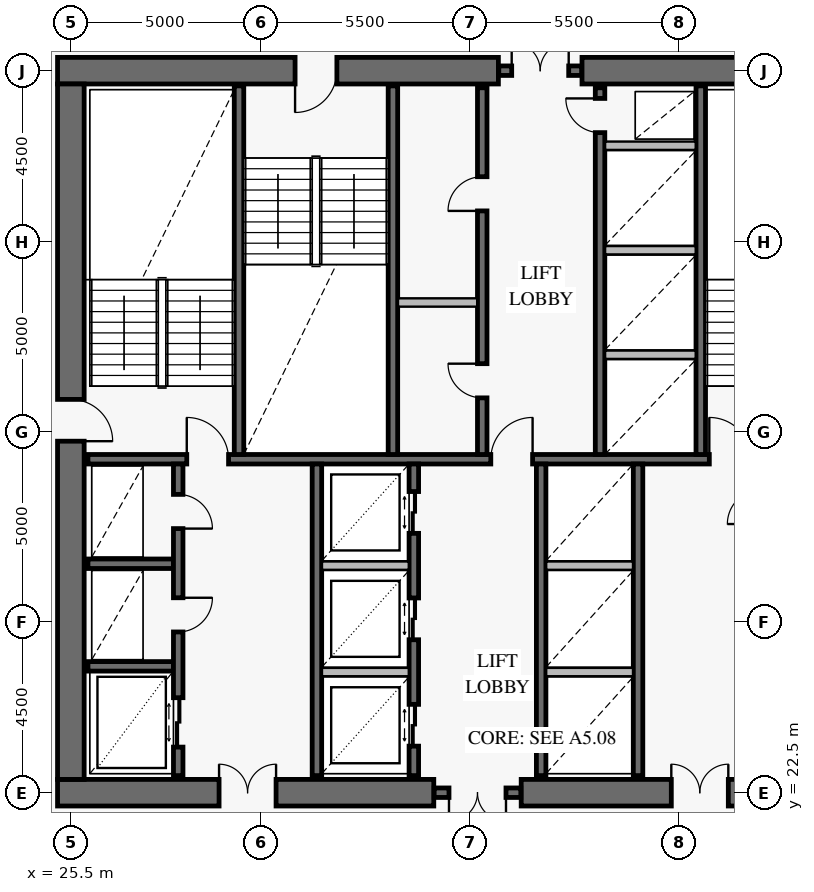
"""IFC4 building model, lengths in metres.
Left out: names, types, materials, properties, quantities, classifications, styles, units other than length and angle.
Written with IfcOpenShell. Run it as: python <this file> out.ifc"""

import sys

from ifc_helpers import new_model, si_unit, direction, frame, frame_2d, origin, place, context, subcontext, project, spatial, rectangle, extrude, element, fill, save


model = new_model("IFC4")
c1 = context("Model", 3, precision=1e-05, world=origin(), true_north=direction((0.0, 1.0)))
c2 = subcontext(c1, "Body", "Model", "MODEL_VIEW")
j1 = project(units=[si_unit("LENGTHUNIT", "METRE"), si_unit("PLANEANGLEUNIT", "RADIAN")], contexts=[c1])
p1 = place(None, origin())
s1 = spatial("IfcSite", under=j1, at=p1, CompositionType="ELEMENT")
p2 = place(p1, origin())
s2 = spatial("IfcBuilding", under=s1, at=p2, CompositionType="ELEMENT")
p3 = place(p2, frame((0.0, 0.0, 92.4)))
s3 = spatial("IfcBuildingStorey", under=s2, at=p3, CompositionType="ELEMENT", Elevation=92.4)
p4 = place(p3, frame((25.15, 22.5, 0.0), z_axis=(0.0, 0.0, 1.0), x_axis=(1.0, 0.0, 0.0)))
e1 = element("IfcWall", 1, at=p4, inside=s3, PredefinedType="SHEAR", context=c2, shape_type="SweptSolid", body=[
    extrude(rectangle(XDim=9.9, YDim=0.7, at=frame_2d((4.95, 0.0))), origin(), (0.0, 0.0, 1.0), 3.8),
])
p5 = place(p4, frame((4.25, 0.0, 0.0)))
e2 = element("IfcOpeningElement", 2, at=p5, cuts=e1, PredefinedType="OPENING", context=c2, shape_type="SweptSolid", body=[
    extrude(rectangle(XDim=1.5, YDim=2.15, at=frame_2d((0.75, 1.075))), frame((0.0, 0.362, 0.0), z_axis=(0.0, -1.0, 0.0), x_axis=(1.0, 0.0, 0.0)), (0.0, 0.0, 1.0), 0.724),
])
p6 = place(p3, frame((37.35, 22.5, 0.0), z_axis=(0.0, 0.0, 1.0), x_axis=(1.0, 0.0, 0.0)))
e3 = element("IfcWall", 3, at=p6, inside=s3, PredefinedType="SHEAR", context=c2, shape_type="SweptSolid", body=[
    extrude(rectangle(XDim=9.5, YDim=0.7, at=frame_2d((4.75, 0.0))), origin(), (0.0, 0.0, 1.0), 3.8),
])
p7 = place(p6, frame((3.95, 0.0, 0.0)))
e4 = element("IfcOpeningElement", 4, at=p7, cuts=e3, PredefinedType="OPENING", context=c2, shape_type="SweptSolid", body=[
    extrude(rectangle(XDim=1.5, YDim=2.15, at=frame_2d((0.75, 1.075))), frame((0.0, 0.362, 0.0), z_axis=(0.0, -1.0, 0.0), x_axis=(1.0, 0.0, 0.0)), (0.0, 0.0, 1.0), 0.724),
])
p8 = place(p3, frame((46.85, 41.5, 0.0), z_axis=(0.0, 0.0, 1.0), x_axis=(-1.0, 0.0, 0.0)))
e5 = element("IfcWall", 5, at=p8, inside=s3, PredefinedType="SHEAR", context=c2, shape_type="SweptSolid", body=[
    extrude(rectangle(XDim=7.9, YDim=0.7, at=frame_2d((3.95, 0.0))), origin(), (0.0, 0.0, 1.0), 3.8),
])
p9 = place(p3, frame((36.75, 41.5, 0.0), z_axis=(0.0, 0.0, 1.0), x_axis=(-1.0, 0.0, 0.0)))
e6 = element("IfcWall", 6, at=p9, inside=s3, PredefinedType="SHEAR", context=c2, shape_type="SweptSolid", body=[
    extrude(rectangle(XDim=11.6, YDim=0.7, at=frame_2d((5.8, 0.0))), origin(), (0.0, 0.0, 1.0), 3.8),
])
p10 = place(p9, frame((4.25, 0.0, 0.0)))
e7 = element("IfcOpeningElement", 7, at=p10, cuts=e6, PredefinedType="OPENING", context=c2, shape_type="SweptSolid", body=[
    extrude(rectangle(XDim=1.1, YDim=2.15, at=frame_2d((0.55, 1.075))), frame((0.0, 0.362, 0.0), z_axis=(0.0, -1.0, 0.0), x_axis=(1.0, 0.0, 0.0)), (0.0, 0.0, 1.0), 0.724),
])
p11 = place(p3, frame((25.5, 22.85, 0.0), z_axis=(0.0, 0.0, 1.0), x_axis=(0.0, 1.0, 0.0)))
e8 = element("IfcWall", 8, at=p11, inside=s3, PredefinedType="SHEAR", context=c2, shape_type="SweptSolid", body=[
    extrude(rectangle(XDim=18.3, YDim=0.7, at=frame_2d((9.15, 0.0))), origin(), (0.0, 0.0, 1.0), 3.8),
])
p12 = place(p11, frame((8.9, 0.0, 0.0)))
e9 = element("IfcOpeningElement", 9, at=p12, cuts=e8, PredefinedType="OPENING", context=c2, shape_type="SweptSolid", body=[
    extrude(rectangle(XDim=1.1, YDim=2.15, at=frame_2d((0.55, 1.075))), frame((0.0, 0.362, 0.0), z_axis=(0.0, -1.0, 0.0), x_axis=(1.0, 0.0, 0.0)), (0.0, 0.0, 1.0), 0.724),
])
p13 = place(p3, frame((35.06, 22.5, 0.0), z_axis=(0.0, 0.0, 1.0), x_axis=(1.0, 0.0, 0.0)))
e10 = element("IfcWall", 10, at=p13, inside=s3, PredefinedType="SOLIDWALL", context=c2, shape_type="SweptSolid", body=[
    extrude(rectangle(XDim=2.28, YDim=0.25, at=frame_2d((1.14, 0.0))), origin(), (0.0, 0.0, 1.0), 3.8),
])
p14 = place(p13, frame((0.39, 0.0, 0.0)))
e11 = element("IfcOpeningElement", 11, at=p14, cuts=e10, PredefinedType="OPENING", context=c2, shape_type="SweptSolid", body=[
    extrude(rectangle(XDim=1.5, YDim=2.15, at=frame_2d((0.75, 1.075))), frame((0.0, 0.137, 0.0), z_axis=(0.0, -1.0, 0.0), x_axis=(1.0, 0.0, 0.0)), (0.0, 0.0, 1.0), 0.274),
])
p15 = place(p3, frame((36.76, 41.5, 0.0), z_axis=(0.0, 0.0, 1.0), x_axis=(1.0, 0.0, 0.0)))
e12 = element("IfcWall", 12, at=p15, inside=s3, PredefinedType="SOLIDWALL", context=c2, shape_type="SweptSolid", body=[
    extrude(rectangle(XDim=2.18, YDim=0.25, at=frame_2d((1.09, 0.0))), origin(), (0.0, 0.0, 1.0), 3.8),
])
p16 = place(p15, frame((0.34, 0.0, 0.0)))
e13 = element("IfcOpeningElement", 13, at=p16, cuts=e12, PredefinedType="OPENING", context=c2, shape_type="SweptSolid", body=[
    extrude(rectangle(XDim=1.5, YDim=2.15, at=frame_2d((0.75, 1.075))), frame((0.0, 0.137, 0.0), z_axis=(0.0, -1.0, 0.0), x_axis=(1.0, 0.0, 0.0)), (0.0, 0.0, 1.0), 0.274),
])
p17 = place(p3, frame((25.95, 31.275, 0.0), z_axis=(0.0, 0.0, 1.0), x_axis=(1.0, 0.0, 0.0)))
e14 = element("IfcWall", 14, at=p17, inside=s3, PredefinedType="SOLIDWALL", context=c2, shape_type="SweptSolid", body=[
    extrude(rectangle(XDim=20.1, YDim=0.25, at=frame_2d((10.05, 0.0))), origin(), (0.0, 0.0, 1.0), 3.8),
])
p18 = place(p17, frame((2.6, 0.0, 0.0)))
e15 = element("IfcOpeningElement", 15, at=p18, cuts=e14, PredefinedType="OPENING", context=c2, shape_type="SweptSolid", body=[
    extrude(rectangle(XDim=1.1, YDim=2.15, at=frame_2d((0.55, 1.075))), frame((0.0, 0.137, 0.0), z_axis=(0.0, -1.0, 0.0), x_axis=(1.0, 0.0, 0.0)), (0.0, 0.0, 1.0), 0.274),
])
p19 = place(p17, frame((10.6, 0.0, 0.0)))
e16 = element("IfcOpeningElement", 16, at=p19, cuts=e14, PredefinedType="OPENING", context=c2, shape_type="SweptSolid", body=[
    extrude(rectangle(XDim=1.1, YDim=2.15, at=frame_2d((0.55, 1.075))), frame((0.0, 0.137, 0.0), z_axis=(0.0, -1.0, 0.0), x_axis=(1.0, 0.0, 0.0)), (0.0, 0.0, 1.0), 0.274),
])
p20 = place(p17, frame((16.35, 0.0, 0.0)))
e17 = element("IfcOpeningElement", 17, at=p20, cuts=e14, PredefinedType="OPENING", context=c2, shape_type="SweptSolid", body=[
    extrude(rectangle(XDim=1.1, YDim=2.15, at=frame_2d((0.55, 1.075))), frame((0.0, 0.137, 0.0), z_axis=(0.0, -1.0, 0.0), x_axis=(1.0, 0.0, 0.0)), (0.0, 0.0, 1.0), 0.274),
])
for number, where, z_axis, x_axis in (
    (18, (29.925, 31.4, 0.0), (0.0, 0.0, 1.0), (0.0, 1.0, 0.0)),
    (19, (33.975, 31.4, 0.0), (0.0, 0.0, 1.0), (0.0, 1.0, 0.0)),
    (20, (42.075, 31.4, 0.0), (0.0, 0.0, 1.0), (0.0, 1.0, 0.0)),
):
    element("IfcWall", number, at=place(p3, frame(where, z_axis=z_axis, x_axis=x_axis)), inside=s3, PredefinedType="SOLIDWALL", context=c2, shape_type="SweptSolid", body=[
        extrude(rectangle(XDim=9.7, YDim=0.25, at=frame_2d((4.85, 0.0))), origin(), (0.0, 0.0, 1.0), 3.8),
    ])
p21 = place(p3, frame((36.325, 31.4, 0.0), z_axis=(0.0, 0.0, 1.0), x_axis=(0.0, 1.0, 0.0)))
e21 = element("IfcWall", 21, at=p21, inside=s3, PredefinedType="SOLIDWALL", context=c2, shape_type="SweptSolid", body=[
    extrude(rectangle(XDim=9.65, YDim=0.25, at=frame_2d((4.825, 0.0))), origin(), (0.0, 0.0, 1.0), 3.8),
])
p22 = place(p21, frame((1.49, 0.0, 0.0)))
e22 = element("IfcOpeningElement", 22, at=p22, cuts=e21, PredefinedType="OPENING", context=c2, shape_type="SweptSolid", body=[
    extrude(rectangle(XDim=0.9, YDim=2.1, at=frame_2d((0.45, 1.05))), frame((0.0, 0.137, 0.0), z_axis=(0.0, -1.0, 0.0), x_axis=(1.0, 0.0, 0.0)), (0.0, 0.0, 1.0), 0.274),
])
p23 = place(p21, frame((6.41, 0.0, 0.0)))
e23 = element("IfcOpeningElement", 23, at=p23, cuts=e21, PredefinedType="OPENING", context=c2, shape_type="SweptSolid", body=[
    extrude(rectangle(XDim=0.9, YDim=2.1, at=frame_2d((0.45, 1.05))), frame((0.0, 0.137, 0.0), z_axis=(0.0, -1.0, 0.0), x_axis=(1.0, 0.0, 0.0)), (0.0, 0.0, 1.0), 0.274),
])
p24 = place(p3, frame((39.425, 31.4, 0.0), z_axis=(0.0, 0.0, 1.0), x_axis=(0.0, 1.0, 0.0)))
e24 = element("IfcWall", 24, at=p24, inside=s3, PredefinedType="SOLIDWALL", context=c2, shape_type="SweptSolid", body=[
    extrude(rectangle(XDim=9.65, YDim=0.25, at=frame_2d((4.825, 0.0))), origin(), (0.0, 0.0, 1.0), 3.8),
])
p25 = place(p24, frame((8.47, 0.0, 0.0)))
e25 = element("IfcOpeningElement", 25, at=p25, cuts=e24, PredefinedType="OPENING", context=c2, shape_type="SweptSolid", body=[
    extrude(rectangle(XDim=0.9, YDim=2.1, at=frame_2d((0.45, 1.05))), frame((0.0, 0.137, 0.0), z_axis=(0.0, -1.0, 0.0), x_axis=(1.0, 0.0, 0.0)), (0.0, 0.0, 1.0), 0.274),
])
for number, where, z_axis, x_axis in (
    (26, (25.95, 25.825, 0.0), (0.0, 0.0, 1.0), (1.0, 0.0, 0.0)),
    (27, (25.95, 28.525, 0.0), (0.0, 0.0, 1.0), (1.0, 0.0, 0.0)),
):
    element("IfcWall", number, at=place(p3, frame(where, z_axis=z_axis, x_axis=x_axis)), inside=s3, PredefinedType="SOLIDWALL", context=c2, shape_type="SweptSolid", body=[
        extrude(rectangle(XDim=2.25, YDim=0.25, at=frame_2d((1.125, 0.0))), origin(), (0.0, 0.0, 1.0), 3.8),
    ])
p26 = place(p3, frame((28.325, 22.95, 0.0), z_axis=(0.0, 0.0, 1.0), x_axis=(0.0, 1.0, 0.0)))
e28 = element("IfcWall", 28, at=p26, inside=s3, PredefinedType="SOLIDWALL", context=c2, shape_type="SweptSolid", body=[
    extrude(rectangle(XDim=8.2, YDim=0.25, at=frame_2d((4.1, 0.0))), origin(), (0.0, 0.0, 1.0), 3.8),
])
p27 = place(p26, frame((0.75, 0.0, 0.0)))
e29 = element("IfcOpeningElement", 29, at=p27, cuts=e28, PredefinedType="OPENING", context=c2, shape_type="SweptSolid", body=[
    extrude(rectangle(XDim=1.3, YDim=2.3, at=frame_2d((0.65, 1.15))), frame((0.0, 0.137, 0.0), z_axis=(0.0, -1.0, 0.0), x_axis=(1.0, 0.0, 0.0)), (0.0, 0.0, 1.0), 0.274),
])
p28 = place(p26, frame((3.78, 0.0, 0.0)))
e30 = element("IfcOpeningElement", 30, at=p28, cuts=e28, PredefinedType="OPENING", context=c2, shape_type="SweptSolid", body=[
    extrude(rectangle(XDim=0.9, YDim=2.1, at=frame_2d((0.45, 1.05))), frame((0.0, 0.137, 0.0), z_axis=(0.0, -1.0, 0.0), x_axis=(1.0, 0.0, 0.0)), (0.0, 0.0, 1.0), 0.274),
])
p29 = place(p26, frame((6.5, 0.0, 0.0)))
e31 = element("IfcOpeningElement", 31, at=p29, cuts=e28, PredefinedType="OPENING", context=c2, shape_type="SweptSolid", body=[
    extrude(rectangle(XDim=0.9, YDim=2.1, at=frame_2d((0.45, 1.05))), frame((0.0, 0.137, 0.0), z_axis=(0.0, -1.0, 0.0), x_axis=(1.0, 0.0, 0.0)), (0.0, 0.0, 1.0), 0.274),
])
p30 = place(p3, frame((31.975, 22.95, 0.0), z_axis=(0.0, 0.0, 1.0), x_axis=(0.0, 1.0, 0.0)))
e32 = element("IfcWall", 32, at=p30, inside=s3, PredefinedType="SOLIDWALL", context=c2, shape_type="SweptSolid", body=[
    extrude(rectangle(XDim=8.2, YDim=0.25, at=frame_2d((4.1, 0.0))), origin(), (0.0, 0.0, 1.0), 3.8),
])
p31 = place(p3, frame((34.525, 22.95, 0.0), z_axis=(0.0, 0.0, 1.0), x_axis=(0.0, 1.0, 0.0)))
e33 = element("IfcWall", 33, at=p31, inside=s3, PredefinedType="SOLIDWALL", context=c2, shape_type="SweptSolid", body=[
    extrude(rectangle(XDim=8.2, YDim=0.25, at=frame_2d((4.1, 0.0))), origin(), (0.0, 0.0, 1.0), 3.8),
])
p32 = place(p31, frame((0.775, 0.0, 0.0)))
e34 = element("IfcOpeningElement", 34, at=p32, cuts=e33, PredefinedType="OPENING", context=c2, shape_type="SweptSolid", body=[
    extrude(rectangle(XDim=1.1, YDim=2.2, at=frame_2d((0.55, 1.1))), frame((0.0, 0.137, 0.0), z_axis=(0.0, -1.0, 0.0), x_axis=(1.0, 0.0, 0.0)), (0.0, 0.0, 1.0), 0.274),
])
p33 = place(p31, frame((3.575, 0.0, 0.0)))
e35 = element("IfcOpeningElement", 35, at=p33, cuts=e33, PredefinedType="OPENING", context=c2, shape_type="SweptSolid", body=[
    extrude(rectangle(XDim=1.1, YDim=2.2, at=frame_2d((0.55, 1.1))), frame((0.0, 0.137, 0.0), z_axis=(0.0, -1.0, 0.0), x_axis=(1.0, 0.0, 0.0)), (0.0, 0.0, 1.0), 0.274),
])
p34 = place(p31, frame((6.375, 0.0, 0.0)))
e36 = element("IfcOpeningElement", 36, at=p34, cuts=e33, PredefinedType="OPENING", context=c2, shape_type="SweptSolid", body=[
    extrude(rectangle(XDim=1.1, YDim=2.2, at=frame_2d((0.55, 1.1))), frame((0.0, 0.137, 0.0), z_axis=(0.0, -1.0, 0.0), x_axis=(1.0, 0.0, 0.0)), (0.0, 0.0, 1.0), 0.274),
])
for number, where, z_axis, x_axis in (
    (37, (37.875, 22.95, 0.0), (0.0, 0.0, 1.0), (0.0, 1.0, 0.0)),
    (38, (40.425, 22.95, 0.0), (0.0, 0.0, 1.0), (0.0, 1.0, 0.0)),
):
    element("IfcWall", number, at=place(p3, frame(where, z_axis=z_axis, x_axis=x_axis)), inside=s3, PredefinedType="SOLIDWALL", context=c2, shape_type="SweptSolid", body=[
        extrude(rectangle(XDim=8.2, YDim=0.25, at=frame_2d((4.1, 0.0))), origin(), (0.0, 0.0, 1.0), 3.8),
    ])
p35 = place(p3, frame((34.108, 35.4, 0.0), z_axis=(0.0, 0.0, 1.0), x_axis=(1.0, 0.0, 0.0)))
e39 = element("IfcWall", 39, at=p35, inside=s3, PredefinedType="PARTITIONING", context=c2, shape_type="SweptSolid", body=[
    extrude(rectangle(XDim=2.084, YDim=0.22, at=frame_2d((1.042, 0.0))), origin(), (0.0, 0.0, 1.0), 3.55),
])
for number, where, z_axis, x_axis in (
    (40, (39.558, 34.025, 0.0), (0.0, 0.0, 1.0), (1.0, 0.0, 0.0)),
    (41, (39.558, 36.775, 0.0), (0.0, 0.0, 1.0), (1.0, 0.0, 0.0)),
    (42, (39.558, 39.525, 0.0), (0.0, 0.0, 1.0), (1.0, 0.0, 0.0)),
):
    element("IfcWall", number, at=place(p3, frame(where, z_axis=z_axis, x_axis=x_axis)), inside=s3, PredefinedType="PARTITIONING", context=c2, shape_type="SweptSolid", body=[
        extrude(rectangle(XDim=2.384, YDim=0.22, at=frame_2d((1.192, 0.0))), origin(), (0.0, 0.0, 1.0), 3.55),
    ])
for number, where, z_axis, x_axis in (
    (43, (32.108, 25.675, 0.0), (0.0, 0.0, 1.0), (1.0, 0.0, 0.0)),
    (44, (32.108, 28.475, 0.0), (0.0, 0.0, 1.0), (1.0, 0.0, 0.0)),
):
    element("IfcWall", number, at=place(p3, frame(where, z_axis=z_axis, x_axis=x_axis)), inside=s3, PredefinedType="PARTITIONING", context=c2, shape_type="SweptSolid", body=[
        extrude(rectangle(XDim=2.284, YDim=0.22, at=frame_2d((1.142, 0.0))), origin(), (0.0, 0.0, 1.0), 3.55),
    ])
for number, where, z_axis, x_axis in (
    (45, (38.008, 25.675, 0.0), (0.0, 0.0, 1.0), (1.0, 0.0, 0.0)),
    (46, (38.008, 28.475, 0.0), (0.0, 0.0, 1.0), (1.0, 0.0, 0.0)),
):
    element("IfcWall", number, at=place(p3, frame(where, z_axis=z_axis, x_axis=x_axis)), inside=s3, PredefinedType="PARTITIONING", context=c2, shape_type="SweptSolid", body=[
        extrude(rectangle(XDim=2.284, YDim=0.22, at=frame_2d((1.142, 0.0))), origin(), (0.0, 0.0, 1.0), 3.55),
    ])
p36 = place(p12, frame((1.1, 0.0, 0.0), z_axis=(0.0, 0.0, 1.0), x_axis=(-1.0, 0.0, 0.0)))
e47 = element("IfcDoor", 47, at=p36, inside=s3, OperationType="SINGLE_SWING_RIGHT", PredefinedType="USERDEFINED", context=c2, shape_type="SweptSolid", body=[
    extrude(rectangle(XDim=1.1, YDim=2.15, at=frame_2d((0.55, 1.075))), frame((0.0, 0.025, 0.0), z_axis=(0.0, -1.0, 0.0), x_axis=(1.0, 0.0, 0.0)), (0.0, 0.0, 1.0), 0.05),
])
fill(e9, e47)
p37 = place(p10, origin())
e48 = element("IfcDoor", 48, at=p37, inside=s3, OperationType="SINGLE_SWING_RIGHT", PredefinedType="USERDEFINED", context=c2, shape_type="SweptSolid", body=[
    extrude(rectangle(XDim=1.1, YDim=2.15, at=frame_2d((0.55, 1.075))), frame((0.0, 0.025, 0.0), z_axis=(0.0, -1.0, 0.0), x_axis=(1.0, 0.0, 0.0)), (0.0, 0.0, 1.0), 0.05),
])
fill(e7, e48)
p38 = place(p5, origin())
e49 = element("IfcDoor", 49, at=p38, inside=s3, OperationType="DOUBLE_DOOR_SINGLE_SWING", PredefinedType="DOOR", context=c2, shape_type="SweptSolid", body=[
    extrude(rectangle(XDim=1.5, YDim=2.15, at=frame_2d((0.75, 1.075))), frame((0.0, 0.025, 0.0), z_axis=(0.0, -1.0, 0.0), x_axis=(1.0, 0.0, 0.0)), (0.0, 0.0, 1.0), 0.05),
])
fill(e2, e49)
p39 = place(p7, origin())
e50 = element("IfcDoor", 50, at=p39, inside=s3, OperationType="DOUBLE_DOOR_SINGLE_SWING", PredefinedType="DOOR", context=c2, shape_type="SweptSolid", body=[
    extrude(rectangle(XDim=1.5, YDim=2.15, at=frame_2d((0.75, 1.075))), frame((0.0, 0.025, 0.0), z_axis=(0.0, -1.0, 0.0), x_axis=(1.0, 0.0, 0.0)), (0.0, 0.0, 1.0), 0.05),
])
fill(e4, e50)
p40 = place(p14, frame((1.5, 0.0, 0.0), z_axis=(0.0, 0.0, 1.0), x_axis=(-1.0, 0.0, 0.0)))
e51 = element("IfcDoor", 51, at=p40, inside=s3, OperationType="DOUBLE_DOOR_SINGLE_SWING", PredefinedType="DOOR", context=c2, shape_type="SweptSolid", body=[
    extrude(rectangle(XDim=1.5, YDim=2.15, at=frame_2d((0.75, 1.075))), frame((0.0, 0.025, 0.0), z_axis=(0.0, -1.0, 0.0), x_axis=(1.0, 0.0, 0.0)), (0.0, 0.0, 1.0), 0.05),
])
fill(e11, e51)
p41 = place(p16, origin())
e52 = element("IfcDoor", 52, at=p41, inside=s3, OperationType="DOUBLE_DOOR_SINGLE_SWING", PredefinedType="DOOR", context=c2, shape_type="SweptSolid", body=[
    extrude(rectangle(XDim=1.5, YDim=2.15, at=frame_2d((0.75, 1.075))), frame((0.0, 0.025, 0.0), z_axis=(0.0, -1.0, 0.0), x_axis=(1.0, 0.0, 0.0)), (0.0, 0.0, 1.0), 0.05),
])
fill(e13, e52)
p42 = place(p18, origin())
e53 = element("IfcDoor", 53, at=p42, inside=s3, OperationType="SINGLE_SWING_LEFT", PredefinedType="USERDEFINED", context=c2, shape_type="SweptSolid", body=[
    extrude(rectangle(XDim=1.1, YDim=2.15, at=frame_2d((0.55, 1.075))), frame((0.0, 0.025, 0.0), z_axis=(0.0, -1.0, 0.0), x_axis=(1.0, 0.0, 0.0)), (0.0, 0.0, 1.0), 0.05),
])
fill(e15, e53)
p43 = place(p19, origin())
e54 = element("IfcDoor", 54, at=p43, inside=s3, OperationType="SINGLE_SWING_RIGHT", PredefinedType="USERDEFINED", context=c2, shape_type="SweptSolid", body=[
    extrude(rectangle(XDim=1.1, YDim=2.15, at=frame_2d((0.55, 1.075))), frame((0.0, 0.025, 0.0), z_axis=(0.0, -1.0, 0.0), x_axis=(1.0, 0.0, 0.0)), (0.0, 0.0, 1.0), 0.05),
])
fill(e16, e54)
p44 = place(p20, origin())
e55 = element("IfcDoor", 55, at=p44, inside=s3, OperationType="SINGLE_SWING_LEFT", PredefinedType="USERDEFINED", context=c2, shape_type="SweptSolid", body=[
    extrude(rectangle(XDim=1.1, YDim=2.15, at=frame_2d((0.55, 1.075))), frame((0.0, 0.025, 0.0), z_axis=(0.0, -1.0, 0.0), x_axis=(1.0, 0.0, 0.0)), (0.0, 0.0, 1.0), 0.05),
])
fill(e17, e55)
p45 = place(p22, origin())
e56 = element("IfcDoor", 56, at=p45, inside=s3, OperationType="SINGLE_SWING_RIGHT", PredefinedType="DOOR", context=c2, shape_type="SweptSolid", body=[
    extrude(rectangle(XDim=0.9, YDim=2.1, at=frame_2d((0.45, 1.05))), frame((0.0, 0.025, 0.0), z_axis=(0.0, -1.0, 0.0), x_axis=(1.0, 0.0, 0.0)), (0.0, 0.0, 1.0), 0.05),
])
fill(e22, e56)
p46 = place(p23, origin())
e57 = element("IfcDoor", 57, at=p46, inside=s3, OperationType="SINGLE_SWING_LEFT", PredefinedType="DOOR", context=c2, shape_type="SweptSolid", body=[
    extrude(rectangle(XDim=0.9, YDim=2.1, at=frame_2d((0.45, 1.05))), frame((0.0, 0.025, 0.0), z_axis=(0.0, -1.0, 0.0), x_axis=(1.0, 0.0, 0.0)), (0.0, 0.0, 1.0), 0.05),
])
fill(e23, e57)
p47 = place(p25, origin())
e58 = element("IfcDoor", 58, at=p47, inside=s3, OperationType="SINGLE_SWING_RIGHT", PredefinedType="DOOR", context=c2, shape_type="SweptSolid", body=[
    extrude(rectangle(XDim=0.9, YDim=2.1, at=frame_2d((0.45, 1.05))), frame((0.0, 0.025, 0.0), z_axis=(0.0, -1.0, 0.0), x_axis=(1.0, 0.0, 0.0)), (0.0, 0.0, 1.0), 0.05),
])
fill(e25, e58)
p48 = place(p27, frame((1.3, 0.0, 0.0), z_axis=(0.0, 0.0, 1.0), x_axis=(-1.0, 0.0, 0.0)))
e59 = element("IfcDoor", 59, at=p48, inside=s3, OperationType="DOUBLE_DOOR_SLIDING", PredefinedType="DOOR", context=c2, shape_type="SweptSolid", body=[
    extrude(rectangle(XDim=1.3, YDim=2.3, at=frame_2d((0.65, 1.15))), frame((0.0, 0.025, 0.0), z_axis=(0.0, -1.0, 0.0), x_axis=(1.0, 0.0, 0.0)), (0.0, 0.0, 1.0), 0.05),
])
fill(e29, e59)
p49 = place(p28, frame((0.9, 0.0, 0.0), z_axis=(0.0, 0.0, 1.0), x_axis=(-1.0, 0.0, 0.0)))
e60 = element("IfcDoor", 60, at=p49, inside=s3, OperationType="SINGLE_SWING_LEFT", PredefinedType="DOOR", context=c2, shape_type="SweptSolid", body=[
    extrude(rectangle(XDim=0.9, YDim=2.1, at=frame_2d((0.45, 1.05))), frame((0.0, 0.025, 0.0), z_axis=(0.0, -1.0, 0.0), x_axis=(1.0, 0.0, 0.0)), (0.0, 0.0, 1.0), 0.05),
])
fill(e30, e60)
p50 = place(p29, frame((0.9, 0.0, 0.0), z_axis=(0.0, 0.0, 1.0), x_axis=(-1.0, 0.0, 0.0)))
e61 = element("IfcDoor", 61, at=p50, inside=s3, OperationType="SINGLE_SWING_RIGHT", PredefinedType="DOOR", context=c2, shape_type="SweptSolid", body=[
    extrude(rectangle(XDim=0.9, YDim=2.1, at=frame_2d((0.45, 1.05))), frame((0.0, 0.025, 0.0), z_axis=(0.0, -1.0, 0.0), x_axis=(1.0, 0.0, 0.0)), (0.0, 0.0, 1.0), 0.05),
])
fill(e31, e61)
p51 = place(p32, frame((1.1, 0.0, 0.0), z_axis=(0.0, 0.0, 1.0), x_axis=(-1.0, 0.0, 0.0)))
e62 = element("IfcDoor", 62, at=p51, inside=s3, OperationType="DOUBLE_DOOR_SLIDING", PredefinedType="DOOR", context=c2, shape_type="SweptSolid", body=[
    extrude(rectangle(XDim=1.1, YDim=2.2, at=frame_2d((0.55, 1.1))), frame((0.0, 0.025, 0.0), z_axis=(0.0, -1.0, 0.0), x_axis=(1.0, 0.0, 0.0)), (0.0, 0.0, 1.0), 0.05),
])
fill(e34, e62)
p52 = place(p33, frame((1.1, 0.0, 0.0), z_axis=(0.0, 0.0, 1.0), x_axis=(-1.0, 0.0, 0.0)))
e63 = element("IfcDoor", 63, at=p52, inside=s3, OperationType="DOUBLE_DOOR_SLIDING", PredefinedType="DOOR", context=c2, shape_type="SweptSolid", body=[
    extrude(rectangle(XDim=1.1, YDim=2.2, at=frame_2d((0.55, 1.1))), frame((0.0, 0.025, 0.0), z_axis=(0.0, -1.0, 0.0), x_axis=(1.0, 0.0, 0.0)), (0.0, 0.0, 1.0), 0.05),
])
fill(e35, e63)
p53 = place(p34, frame((1.1, 0.0, 0.0), z_axis=(0.0, 0.0, 1.0), x_axis=(-1.0, 0.0, 0.0)))
e64 = element("IfcDoor", 64, at=p53, inside=s3, OperationType="DOUBLE_DOOR_SLIDING", PredefinedType="DOOR", context=c2, shape_type="SweptSolid", body=[
    extrude(rectangle(XDim=1.1, YDim=2.2, at=frame_2d((0.55, 1.1))), frame((0.0, 0.025, 0.0), z_axis=(0.0, -1.0, 0.0), x_axis=(1.0, 0.0, 0.0)), (0.0, 0.0, 1.0), 0.05),
])
fill(e36, e64)
save(model, sys.argv[1])
